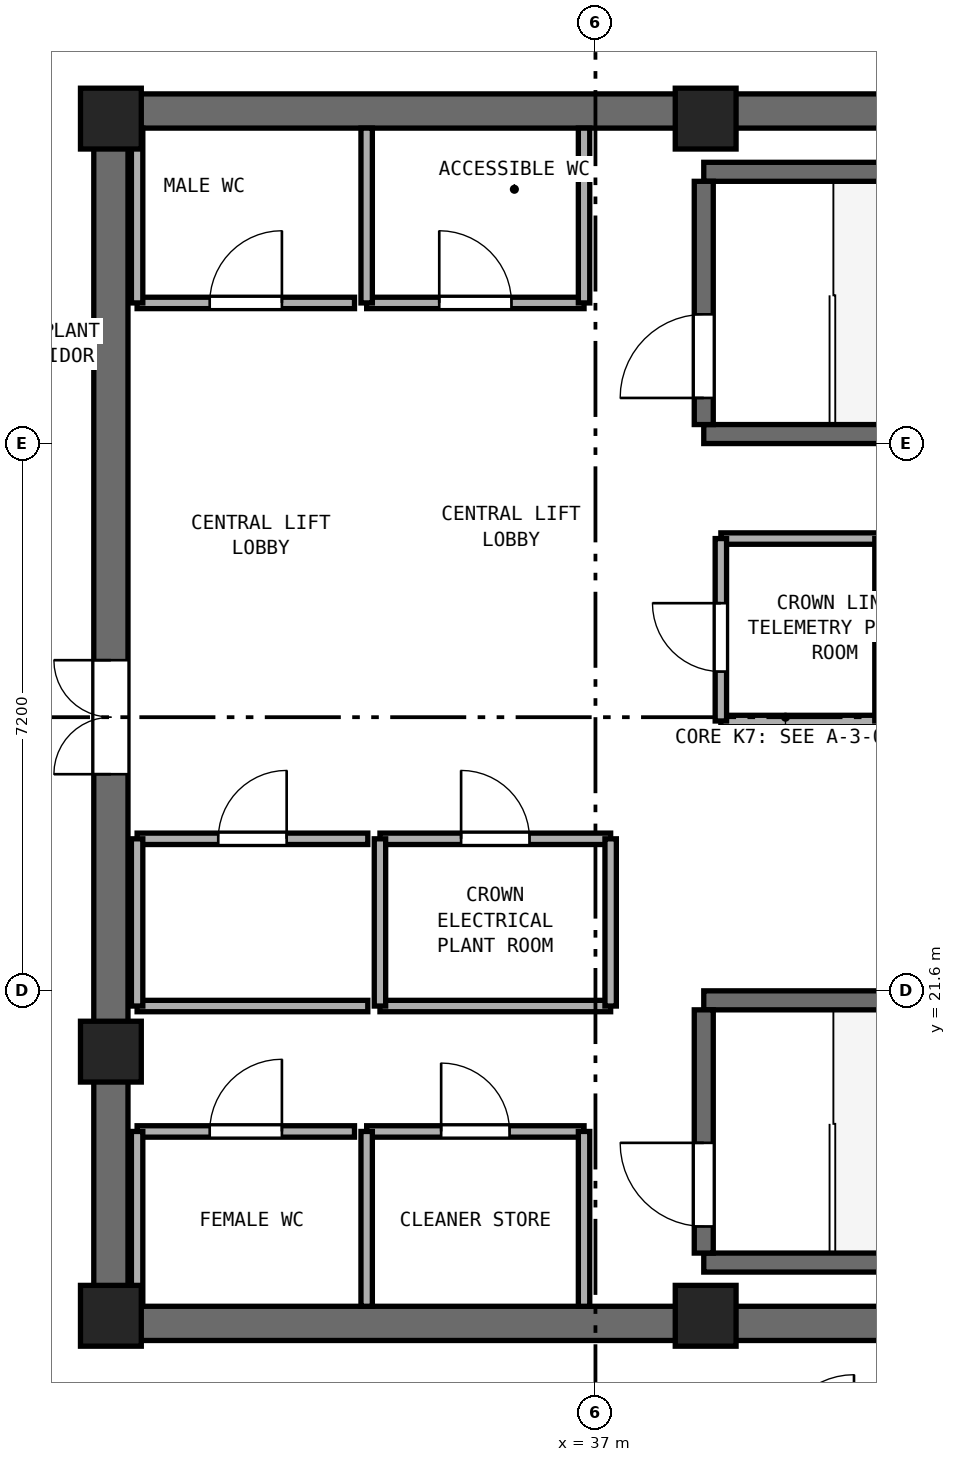
"""IFC4 building model, lengths in metres.
Left out: names, types, materials, properties, quantities, classifications, styles, units other than length and angle.
Written with IfcOpenShell. Run it as: python <this file> out.ifc"""

import sys

from ifc_helpers import new_model, si_unit, direction, frame, frame_2d, origin, origin_2d, place, context, subcontext, project, spatial, rectangle, extrude, element, fill, save


model = new_model("IFC4")
c1 = context("Model", 3, precision=1e-05, world=origin(), true_north=direction((0.0, 1.0)))
c2 = subcontext(c1, "Body", "Model", "MODEL_VIEW")
j1 = project(units=[si_unit("LENGTHUNIT", "METRE"), si_unit("PLANEANGLEUNIT", "RADIAN")], contexts=[c1])
p1 = place(None, origin())
s1 = spatial("IfcSite", under=j1, at=p1, CompositionType="ELEMENT")
p2 = place(p1, origin())
s2 = spatial("IfcBuilding", under=s1, at=p2, CompositionType="ELEMENT")
p3 = place(p2, frame((0.0, 0.0, 333.4)))
s3 = spatial("IfcBuildingStorey", under=s2, at=p3, CompositionType="ELEMENT", Elevation=333.4)
for number, where, z_axis, x_axis in (
    (1, (30.4, 17.225, 0.0), (0.0, 0.0, 1.0), (1.0, 0.0, 0.0)),
    (2, (30.4, 33.175, 0.0), (0.0, 0.0, 1.0), (1.0, 0.0, 0.0)),
):
    element("IfcWall", number, at=place(p3, frame(where, z_axis=z_axis, x_axis=x_axis)), inside=s3, PredefinedType="SHEAR", context=c2, shape_type="SweptSolid", body=[
        extrude(rectangle(XDim=18.2, YDim=0.45, at=frame_2d((9.1, 0.0))), origin(), (0.0, 0.0, 1.0), 3.7),
    ])
p4 = place(p3, frame((30.625, 17.45, 0.0), z_axis=(0.0, 0.0, 1.0), x_axis=(0.0, 1.0, 0.0)))
e3 = element("IfcWall", 3, at=p4, inside=s3, PredefinedType="SHEAR", context=c2, shape_type="SweptSolid", body=[
    extrude(rectangle(XDim=15.5, YDim=0.45, at=frame_2d((7.75, 0.0))), origin(), (0.0, 0.0, 1.0), 3.7),
])
p5 = place(p4, frame((7.0, 0.0, 0.0)))
e4 = element("IfcOpeningElement", 4, at=p5, cuts=e3, PredefinedType="OPENING", context=c2, shape_type="SweptSolid", body=[
    extrude(rectangle(XDim=1.5, YDim=2.15, at=frame_2d((0.75, 1.075))), frame((0.0, 0.235, 0.0), z_axis=(0.0, -1.0, 0.0), x_axis=(1.0, 0.0, 0.0)), (0.0, 0.0, 1.0), 0.47),
])
for number, where, z_axis, x_axis in (
    (5, (30.625, 17.325, 0.0), (0.0, 0.0, 1.0), (1.0, 0.0, 0.0)),
    (6, (38.45, 17.325, 0.0), (0.0, 0.0, 1.0), (1.0, 0.0, 0.0)),
    (7, (38.45, 33.075, 0.0), (0.0, 0.0, 1.0), (1.0, 0.0, 0.0)),
    (8, (30.625, 33.075, 0.0), (0.0, 0.0, 1.0), (1.0, 0.0, 0.0)),
    (9, (30.625, 20.8, 0.0), (0.0, 0.0, 1.0), (1.0, 0.0, 0.0)),
):
    element("IfcColumn", number, at=place(p3, frame(where, z_axis=z_axis, x_axis=x_axis)), inside=s3, PredefinedType="PILASTER", context=c2, shape_type="SweptSolid", body=[
        extrude(rectangle(XDim=0.8, YDim=0.8, at=origin_2d()), origin(), (0.0, 0.0, 1.0), 4.0),
    ])
for number, where, z_axis, x_axis in (
    (10, (38.425, 28.925, 0.0), (0.0, 0.0, 1.0), (1.0, 0.0, 0.0)),
    (11, (38.425, 32.375, 0.0), (0.0, 0.0, 1.0), (1.0, 0.0, 0.0)),
):
    element("IfcWall", number, at=place(p3, frame(where, z_axis=z_axis, x_axis=x_axis)), inside=s3, PredefinedType="SHEAR", context=c2, shape_type="SweptSolid", body=[
        extrude(rectangle(XDim=7.3, YDim=0.25, at=frame_2d((3.65, 0.0))), origin(), (0.0, 0.0, 1.0), 3.7),
    ])
p6 = place(p3, frame((38.425, 29.05, 0.0), z_axis=(0.0, 0.0, 1.0), x_axis=(0.0, 1.0, 0.0)))
e12 = element("IfcWall", 12, at=p6, inside=s3, PredefinedType="SHEAR", context=c2, shape_type="SweptSolid", body=[
    extrude(rectangle(XDim=3.2, YDim=0.25, at=frame_2d((1.6, 0.0))), origin(), (0.0, 0.0, 1.0), 3.7),
])
p7 = place(p6, frame((0.35, 0.0, 0.0)))
e13 = element("IfcOpeningElement", 13, at=p7, cuts=e12, PredefinedType="OPENING", context=c2, shape_type="SweptSolid", body=[
    extrude(rectangle(XDim=1.1, YDim=2.15, at=frame_2d((0.55, 1.075))), frame((0.0, 0.135, 0.0), z_axis=(0.0, -1.0, 0.0), x_axis=(1.0, 0.0, 0.0)), (0.0, 0.0, 1.0), 0.27),
])
for number, where, z_axis, x_axis in (
    (14, (38.425, 18.025, 0.0), (0.0, 0.0, 1.0), (1.0, 0.0, 0.0)),
    (15, (38.425, 21.475, 0.0), (0.0, 0.0, 1.0), (1.0, 0.0, 0.0)),
):
    element("IfcWall", number, at=place(p3, frame(where, z_axis=z_axis, x_axis=x_axis)), inside=s3, PredefinedType="SHEAR", context=c2, shape_type="SweptSolid", body=[
        extrude(rectangle(XDim=7.3, YDim=0.25, at=frame_2d((3.65, 0.0))), origin(), (0.0, 0.0, 1.0), 3.7),
    ])
p8 = place(p3, frame((38.425, 18.15, 0.0), z_axis=(0.0, 0.0, 1.0), x_axis=(0.0, 1.0, 0.0)))
e16 = element("IfcWall", 16, at=p8, inside=s3, PredefinedType="SHEAR", context=c2, shape_type="SweptSolid", body=[
    extrude(rectangle(XDim=3.2, YDim=0.25, at=frame_2d((1.6, 0.0))), origin(), (0.0, 0.0, 1.0), 3.7),
])
p9 = place(p8, frame((0.35, 0.0, 0.0)))
e17 = element("IfcOpeningElement", 17, at=p9, cuts=e16, PredefinedType="OPENING", context=c2, shape_type="SweptSolid", body=[
    extrude(rectangle(XDim=1.1, YDim=2.15, at=frame_2d((0.55, 1.075))), frame((0.0, 0.135, 0.0), z_axis=(0.0, -1.0, 0.0), x_axis=(1.0, 0.0, 0.0)), (0.0, 0.0, 1.0), 0.27),
])
p10 = place(p3, frame((30.97, 30.65, 0.0), z_axis=(0.0, 0.0, 1.0), x_axis=(1.0, 0.0, 0.0)))
e18 = element("IfcWall", 18, at=p10, inside=s3, PredefinedType="PARTITIONING", context=c2, shape_type="SweptSolid", body=[
    extrude(rectangle(XDim=2.86, YDim=0.15, at=frame_2d((1.43, 0.0))), origin(), (0.0, 0.0, 1.0), 3.7),
])
p11 = place(p10, frame((0.955, 0.0, 0.0)))
e19 = element("IfcOpeningElement", 19, at=p11, cuts=e18, PredefinedType="OPENING", context=c2, shape_type="SweptSolid", body=[
    extrude(rectangle(XDim=0.95, YDim=2.1, at=frame_2d((0.475, 1.05))), frame((0.0, 0.085, 0.0), z_axis=(0.0, -1.0, 0.0), x_axis=(1.0, 0.0, 0.0)), (0.0, 0.0, 1.0), 0.17),
])
p12 = place(p3, frame((30.97, 30.65, 0.0), z_axis=(0.0, 0.0, 1.0), x_axis=(0.0, 1.0, 0.0)))
e20 = element("IfcWall", 20, at=p12, inside=s3, PredefinedType="PARTITIONING", context=c2, shape_type="SweptSolid", body=[
    extrude(rectangle(XDim=2.3, YDim=0.15, at=frame_2d((1.15, 0.0))), origin(), (0.0, 0.0, 1.0), 2.8),
])
p13 = place(p3, frame((33.99, 30.65, 0.0), z_axis=(0.0, 0.0, 1.0), x_axis=(1.0, 0.0, 0.0)))
e21 = element("IfcWall", 21, at=p13, inside=s3, PredefinedType="PARTITIONING", context=c2, shape_type="SweptSolid", body=[
    extrude(rectangle(XDim=2.86, YDim=0.15, at=frame_2d((1.43, 0.0))), origin(), (0.0, 0.0, 1.0), 3.7),
])
p14 = place(p13, frame((0.955, 0.0, 0.0)))
e22 = element("IfcOpeningElement", 22, at=p14, cuts=e21, PredefinedType="OPENING", context=c2, shape_type="SweptSolid", body=[
    extrude(rectangle(XDim=0.95, YDim=2.1, at=frame_2d((0.475, 1.05))), frame((0.0, 0.085, 0.0), z_axis=(0.0, -1.0, 0.0), x_axis=(1.0, 0.0, 0.0)), (0.0, 0.0, 1.0), 0.17),
])
for number, where, z_axis, x_axis in (
    (23, (33.99, 30.65, 0.0), (0.0, 0.0, 1.0), (0.0, 1.0, 0.0)),
    (24, (36.85, 30.65, 0.0), (0.0, 0.0, 1.0), (0.0, 1.0, 0.0)),
):
    element("IfcWall", number, at=place(p3, frame(where, z_axis=z_axis, x_axis=x_axis)), inside=s3, PredefinedType="PARTITIONING", context=c2, shape_type="SweptSolid", body=[
        extrude(rectangle(XDim=2.3, YDim=0.15, at=frame_2d((1.15, 0.0))), origin(), (0.0, 0.0, 1.0), 3.7),
    ])
p15 = place(p3, frame((30.97, 19.75, 0.0), z_axis=(0.0, 0.0, 1.0), x_axis=(1.0, 0.0, 0.0)))
e25 = element("IfcWall", 25, at=p15, inside=s3, PredefinedType="PARTITIONING", context=c2, shape_type="SweptSolid", body=[
    extrude(rectangle(XDim=2.86, YDim=0.15, at=frame_2d((1.43, 0.0))), origin(), (0.0, 0.0, 1.0), 3.7),
])
p16 = place(p15, frame((0.955, 0.0, 0.0)))
e26 = element("IfcOpeningElement", 26, at=p16, cuts=e25, PredefinedType="OPENING", context=c2, shape_type="SweptSolid", body=[
    extrude(rectangle(XDim=0.95, YDim=2.1, at=frame_2d((0.475, 1.05))), frame((0.0, 0.085, 0.0), z_axis=(0.0, -1.0, 0.0), x_axis=(1.0, 0.0, 0.0)), (0.0, 0.0, 1.0), 0.17),
])
p17 = place(p3, frame((30.97, 17.45, 0.0), z_axis=(0.0, 0.0, 1.0), x_axis=(0.0, 1.0, 0.0)))
e27 = element("IfcWall", 27, at=p17, inside=s3, PredefinedType="PARTITIONING", context=c2, shape_type="SweptSolid", body=[
    extrude(rectangle(XDim=2.3, YDim=0.15, at=frame_2d((1.15, 0.0))), origin(), (0.0, 0.0, 1.0), 2.8),
])
p18 = place(p3, frame((33.99, 19.75, 0.0), z_axis=(0.0, 0.0, 1.0), x_axis=(1.0, 0.0, 0.0)))
e28 = element("IfcWall", 28, at=p18, inside=s3, PredefinedType="PARTITIONING", context=c2, shape_type="SweptSolid", body=[
    extrude(rectangle(XDim=2.86, YDim=0.15, at=frame_2d((1.43, 0.0))), origin(), (0.0, 0.0, 1.0), 3.7),
])
p19 = place(p18, frame((0.98, 0.0, 0.0)))
e29 = element("IfcOpeningElement", 29, at=p19, cuts=e28, PredefinedType="OPENING", context=c2, shape_type="SweptSolid", body=[
    extrude(rectangle(XDim=0.9, YDim=2.1, at=frame_2d((0.45, 1.05))), frame((0.0, 0.085, 0.0), z_axis=(0.0, -1.0, 0.0), x_axis=(1.0, 0.0, 0.0)), (0.0, 0.0, 1.0), 0.17),
])
for number, where, z_axis, x_axis in (
    (30, (33.99, 17.45, 0.0), (0.0, 0.0, 1.0), (0.0, 1.0, 0.0)),
    (31, (36.85, 17.45, 0.0), (0.0, 0.0, 1.0), (0.0, 1.0, 0.0)),
):
    element("IfcWall", number, at=place(p3, frame(where, z_axis=z_axis, x_axis=x_axis)), inside=s3, PredefinedType="PARTITIONING", context=c2, shape_type="SweptSolid", body=[
        extrude(rectangle(XDim=2.3, YDim=0.15, at=frame_2d((1.15, 0.0))), origin(), (0.0, 0.0, 1.0), 3.7),
    ])
p20 = place(p3, frame((30.97, 21.4, 0.0), z_axis=(0.0, 0.0, 1.0), x_axis=(1.0, 0.0, 0.0)))
e32 = element("IfcWall", 32, at=p20, inside=s3, PredefinedType="PARTITIONING", context=c2, shape_type="SweptSolid", body=[
    extrude(rectangle(XDim=3.035, YDim=0.15, at=frame_2d((1.518, 0.0))), origin(), (0.0, 0.0, 1.0), 3.7),
])
p21 = place(p3, frame((30.97, 23.6, 0.0), z_axis=(0.0, 0.0, 1.0), x_axis=(1.0, 0.0, 0.0)))
e33 = element("IfcWall", 33, at=p21, inside=s3, PredefinedType="PARTITIONING", context=c2, shape_type="SweptSolid", body=[
    extrude(rectangle(XDim=3.035, YDim=0.15, at=frame_2d((1.518, 0.0))), origin(), (0.0, 0.0, 1.0), 3.7),
])
p22 = place(p21, frame((1.067, 0.0, 0.0)))
e34 = element("IfcOpeningElement", 34, at=p22, cuts=e33, PredefinedType="OPENING", context=c2, shape_type="SweptSolid", body=[
    extrude(rectangle(XDim=0.9, YDim=2.1, at=frame_2d((0.45, 1.05))), frame((0.0, 0.085, 0.0), z_axis=(0.0, -1.0, 0.0), x_axis=(1.0, 0.0, 0.0)), (0.0, 0.0, 1.0), 0.17),
])
p23 = place(p3, frame((30.97, 21.4, 0.0), z_axis=(0.0, 0.0, 1.0), x_axis=(0.0, 1.0, 0.0)))
e35 = element("IfcWall", 35, at=p23, inside=s3, PredefinedType="PARTITIONING", context=c2, shape_type="SweptSolid", body=[
    extrude(rectangle(XDim=2.2, YDim=0.15, at=frame_2d((1.1, 0.0))), origin(), (0.0, 0.0, 1.0), 2.8),
])
p24 = place(p3, frame((34.165, 21.4, 0.0), z_axis=(0.0, 0.0, 1.0), x_axis=(1.0, 0.0, 0.0)))
e36 = element("IfcWall", 36, at=p24, inside=s3, PredefinedType="PARTITIONING", context=c2, shape_type="SweptSolid", body=[
    extrude(rectangle(XDim=3.035, YDim=0.15, at=frame_2d((1.518, 0.0))), origin(), (0.0, 0.0, 1.0), 3.7),
])
p25 = place(p3, frame((34.165, 23.6, 0.0), z_axis=(0.0, 0.0, 1.0), x_axis=(1.0, 0.0, 0.0)))
e37 = element("IfcWall", 37, at=p25, inside=s3, PredefinedType="PARTITIONING", context=c2, shape_type="SweptSolid", body=[
    extrude(rectangle(XDim=3.035, YDim=0.15, at=frame_2d((1.518, 0.0))), origin(), (0.0, 0.0, 1.0), 3.7),
])
p26 = place(p25, frame((1.067, 0.0, 0.0)))
e38 = element("IfcOpeningElement", 38, at=p26, cuts=e37, PredefinedType="OPENING", context=c2, shape_type="SweptSolid", body=[
    extrude(rectangle(XDim=0.9, YDim=2.1, at=frame_2d((0.45, 1.05))), frame((0.0, 0.085, 0.0), z_axis=(0.0, -1.0, 0.0), x_axis=(1.0, 0.0, 0.0)), (0.0, 0.0, 1.0), 0.17),
])
for number, where, z_axis, x_axis in (
    (39, (34.165, 21.4, 0.0), (0.0, 0.0, 1.0), (0.0, 1.0, 0.0)),
    (40, (37.2, 21.4, 0.0), (0.0, 0.0, 1.0), (0.0, 1.0, 0.0)),
):
    element("IfcWall", number, at=place(p3, frame(where, z_axis=z_axis, x_axis=x_axis)), inside=s3, PredefinedType="PARTITIONING", context=c2, shape_type="SweptSolid", body=[
        extrude(rectangle(XDim=2.2, YDim=0.15, at=frame_2d((1.1, 0.0))), origin(), (0.0, 0.0, 1.0), 3.7),
    ])
for number, where, z_axis, x_axis in (
    (41, (38.65, 25.15, 0.0), (0.0, 0.0, 1.0), (1.0, 0.0, 0.0)),
    (42, (38.65, 27.55, 0.0), (0.0, 0.0, 1.0), (1.0, 0.0, 0.0)),
):
    element("IfcWall", number, at=place(p3, frame(where, z_axis=z_axis, x_axis=x_axis)), inside=s3, PredefinedType="PARTITIONING", context=c2, shape_type="SweptSolid", body=[
        extrude(rectangle(XDim=2.1, YDim=0.15, at=frame_2d((1.05, 0.0))), origin(), (0.0, 0.0, 1.0), 3.7),
    ])
p27 = place(p3, frame((38.65, 25.15, 0.0), z_axis=(0.0, 0.0, 1.0), x_axis=(0.0, 1.0, 0.0)))
e43 = element("IfcWall", 43, at=p27, inside=s3, PredefinedType="PARTITIONING", context=c2, shape_type="SweptSolid", body=[
    extrude(rectangle(XDim=2.4, YDim=0.15, at=frame_2d((1.2, 0.0))), origin(), (0.0, 0.0, 1.0), 3.7),
])
p28 = place(p27, frame((0.65, 0.0, 0.0)))
e44 = element("IfcOpeningElement", 44, at=p28, cuts=e43, PredefinedType="OPENING", context=c2, shape_type="SweptSolid", body=[
    extrude(rectangle(XDim=0.9, YDim=2.1, at=frame_2d((0.45, 1.05))), frame((0.0, 0.085, 0.0), z_axis=(0.0, -1.0, 0.0), x_axis=(1.0, 0.0, 0.0)), (0.0, 0.0, 1.0), 0.17),
])
p29 = place(p3, frame((40.75, 25.15, 0.0), z_axis=(0.0, 0.0, 1.0), x_axis=(0.0, 1.0, 0.0)))
e45 = element("IfcWall", 45, at=p29, inside=s3, PredefinedType="PARTITIONING", context=c2, shape_type="SweptSolid", body=[
    extrude(rectangle(XDim=2.4, YDim=0.15, at=frame_2d((1.2, 0.0))), origin(), (0.0, 0.0, 1.0), 3.7),
])
p30 = place(p3, frame((33.654, 38.976, 0.0), z_axis=(0.0, 0.0, 1.0), x_axis=(-0.72588023988, -0.687821108539, 0.0)))
e46 = element("IfcWall", 46, at=p30, inside=s3, PredefinedType="STANDARD", context=c2, shape_type="SweptSolid", body=[
    extrude(rectangle(XDim=9.122, YDim=0.28, at=frame_2d((4.561, 0.0))), origin(), (0.0, 0.0, 1.0), 3.7),
])
p31 = place(p30, frame((1.054, 0.0, 0.9)))
e47 = element("IfcOpeningElement", 47, at=p31, cuts=e46, PredefinedType="OPENING", context=c2, shape_type="SweptSolid", body=[
    extrude(rectangle(XDim=1.6, YDim=1.45, at=frame_2d((0.8, 0.725))), frame((0.0, 0.15, 0.0), z_axis=(0.0, -1.0, 0.0), x_axis=(1.0, 0.0, 0.0)), (0.0, 0.0, 1.0), 0.3),
])
p32 = place(p30, frame((3.511, 0.0, 0.9)))
e48 = element("IfcOpeningElement", 48, at=p32, cuts=e46, PredefinedType="OPENING", context=c2, shape_type="SweptSolid", body=[
    extrude(rectangle(XDim=1.6, YDim=1.45, at=frame_2d((0.8, 0.725))), frame((0.0, 0.15, 0.0), z_axis=(0.0, -1.0, 0.0), x_axis=(1.0, 0.0, 0.0)), (0.0, 0.0, 1.0), 0.3),
])
p33 = place(p3, frame((27.114, 17.109, 0.0), z_axis=(0.0, 0.0, 1.0), x_axis=(0.751684867815, -0.659522448062, 0.0)))
e49 = element("IfcWall", 49, at=p33, inside=s3, PredefinedType="STANDARD", context=c2, shape_type="SweptSolid", body=[
    extrude(rectangle(XDim=8.723, YDim=0.28, at=frame_2d((4.362, 0.0))), origin(), (0.0, 0.0, 1.0), 3.7),
])
p34 = place(p33, frame((3.562, 0.0, 0.9)))
e50 = element("IfcOpeningElement", 50, at=p34, cuts=e49, PredefinedType="OPENING", context=c2, shape_type="SweptSolid", body=[
    extrude(rectangle(XDim=1.6, YDim=1.45, at=frame_2d((0.8, 0.725))), frame((0.0, 0.15, 0.0), z_axis=(0.0, -1.0, 0.0), x_axis=(1.0, 0.0, 0.0)), (0.0, 0.0, 1.0), 0.3),
])
p35 = place(p33, frame((6.136, 0.0, 0.9)))
e51 = element("IfcOpeningElement", 51, at=p35, cuts=e49, PredefinedType="OPENING", context=c2, shape_type="SweptSolid", body=[
    extrude(rectangle(XDim=1.6, YDim=1.45, at=frame_2d((0.8, 0.725))), frame((0.0, 0.15, 0.0), z_axis=(0.0, -1.0, 0.0), x_axis=(1.0, 0.0, 0.0)), (0.0, 0.0, 1.0), 0.3),
])
p36 = place(p7, origin())
e52 = element("IfcDoor", 52, at=p36, inside=s3, OperationType="SINGLE_SWING_LEFT", PredefinedType="DOOR", context=c2, shape_type="SweptSolid", body=[
    extrude(rectangle(XDim=1.1, YDim=2.15, at=frame_2d((0.55, 1.075))), frame((0.0, 0.025, 0.0), z_axis=(0.0, -1.0, 0.0), x_axis=(1.0, 0.0, 0.0)), (0.0, 0.0, 1.0), 0.05),
])
fill(e13, e52)
p37 = place(p9, origin())
e53 = element("IfcDoor", 53, at=p37, inside=s3, OperationType="SINGLE_SWING_RIGHT", PredefinedType="DOOR", context=c2, shape_type="SweptSolid", body=[
    extrude(rectangle(XDim=1.1, YDim=2.15, at=frame_2d((0.55, 1.075))), frame((0.0, 0.025, 0.0), z_axis=(0.0, -1.0, 0.0), x_axis=(1.0, 0.0, 0.0)), (0.0, 0.0, 1.0), 0.05),
])
fill(e17, e53)
p38 = place(p5, origin())
e54 = element("IfcDoor", 54, at=p38, inside=s3, OperationType="DOUBLE_DOOR_SINGLE_SWING", PredefinedType="DOOR", context=c2, shape_type="SweptSolid", body=[
    extrude(rectangle(XDim=1.5, YDim=2.15, at=frame_2d((0.75, 1.075))), frame((0.0, 0.025, 0.0), z_axis=(0.0, -1.0, 0.0), x_axis=(1.0, 0.0, 0.0)), (0.0, 0.0, 1.0), 0.05),
])
fill(e4, e54)
p39 = place(p11, origin())
e55 = element("IfcDoor", 55, at=p39, inside=s3, OperationType="SINGLE_SWING_RIGHT", PredefinedType="DOOR", context=c2, shape_type="SweptSolid", body=[
    extrude(rectangle(XDim=0.95, YDim=2.1, at=frame_2d((0.475, 1.05))), frame((0.0, 0.025, 0.0), z_axis=(0.0, -1.0, 0.0), x_axis=(1.0, 0.0, 0.0)), (0.0, 0.0, 1.0), 0.05),
])
fill(e19, e55)
p40 = place(p14, origin())
e56 = element("IfcDoor", 56, at=p40, inside=s3, OperationType="SINGLE_SWING_LEFT", PredefinedType="DOOR", context=c2, shape_type="SweptSolid", body=[
    extrude(rectangle(XDim=0.95, YDim=2.1, at=frame_2d((0.475, 1.05))), frame((0.0, 0.025, 0.0), z_axis=(0.0, -1.0, 0.0), x_axis=(1.0, 0.0, 0.0)), (0.0, 0.0, 1.0), 0.05),
])
fill(e22, e56)
p41 = place(p16, origin())
e57 = element("IfcDoor", 57, at=p41, inside=s3, OperationType="SINGLE_SWING_RIGHT", PredefinedType="DOOR", context=c2, shape_type="SweptSolid", body=[
    extrude(rectangle(XDim=0.95, YDim=2.1, at=frame_2d((0.475, 1.05))), frame((0.0, 0.025, 0.0), z_axis=(0.0, -1.0, 0.0), x_axis=(1.0, 0.0, 0.0)), (0.0, 0.0, 1.0), 0.05),
])
fill(e26, e57)
p42 = place(p19, origin())
e58 = element("IfcDoor", 58, at=p42, inside=s3, OperationType="SINGLE_SWING_LEFT", PredefinedType="DOOR", context=c2, shape_type="SweptSolid", body=[
    extrude(rectangle(XDim=0.9, YDim=2.1, at=frame_2d((0.45, 1.05))), frame((0.0, 0.025, 0.0), z_axis=(0.0, -1.0, 0.0), x_axis=(1.0, 0.0, 0.0)), (0.0, 0.0, 1.0), 0.05),
])
fill(e29, e58)
p43 = place(p22, origin())
e59 = element("IfcDoor", 59, at=p43, inside=s3, OperationType="SINGLE_SWING_RIGHT", PredefinedType="DOOR", context=c2, shape_type="SweptSolid", body=[
    extrude(rectangle(XDim=0.9, YDim=2.1, at=frame_2d((0.45, 1.05))), frame((0.0, 0.025, 0.0), z_axis=(0.0, -1.0, 0.0), x_axis=(1.0, 0.0, 0.0)), (0.0, 0.0, 1.0), 0.05),
])
fill(e34, e59)
p44 = place(p26, origin())
e60 = element("IfcDoor", 60, at=p44, inside=s3, OperationType="SINGLE_SWING_LEFT", PredefinedType="DOOR", context=c2, shape_type="SweptSolid", body=[
    extrude(rectangle(XDim=0.9, YDim=2.1, at=frame_2d((0.45, 1.05))), frame((0.0, 0.025, 0.0), z_axis=(0.0, -1.0, 0.0), x_axis=(1.0, 0.0, 0.0)), (0.0, 0.0, 1.0), 0.05),
])
fill(e38, e60)
p45 = place(p28, origin())
e61 = element("IfcDoor", 61, at=p45, inside=s3, OperationType="SINGLE_SWING_RIGHT", PredefinedType="DOOR", context=c2, shape_type="SweptSolid", body=[
    extrude(rectangle(XDim=0.9, YDim=2.1, at=frame_2d((0.45, 1.05))), frame((0.0, 0.025, 0.0), z_axis=(0.0, -1.0, 0.0), x_axis=(1.0, 0.0, 0.0)), (0.0, 0.0, 1.0), 0.05),
])
fill(e44, e61)
save(model, sys.argv[1])
